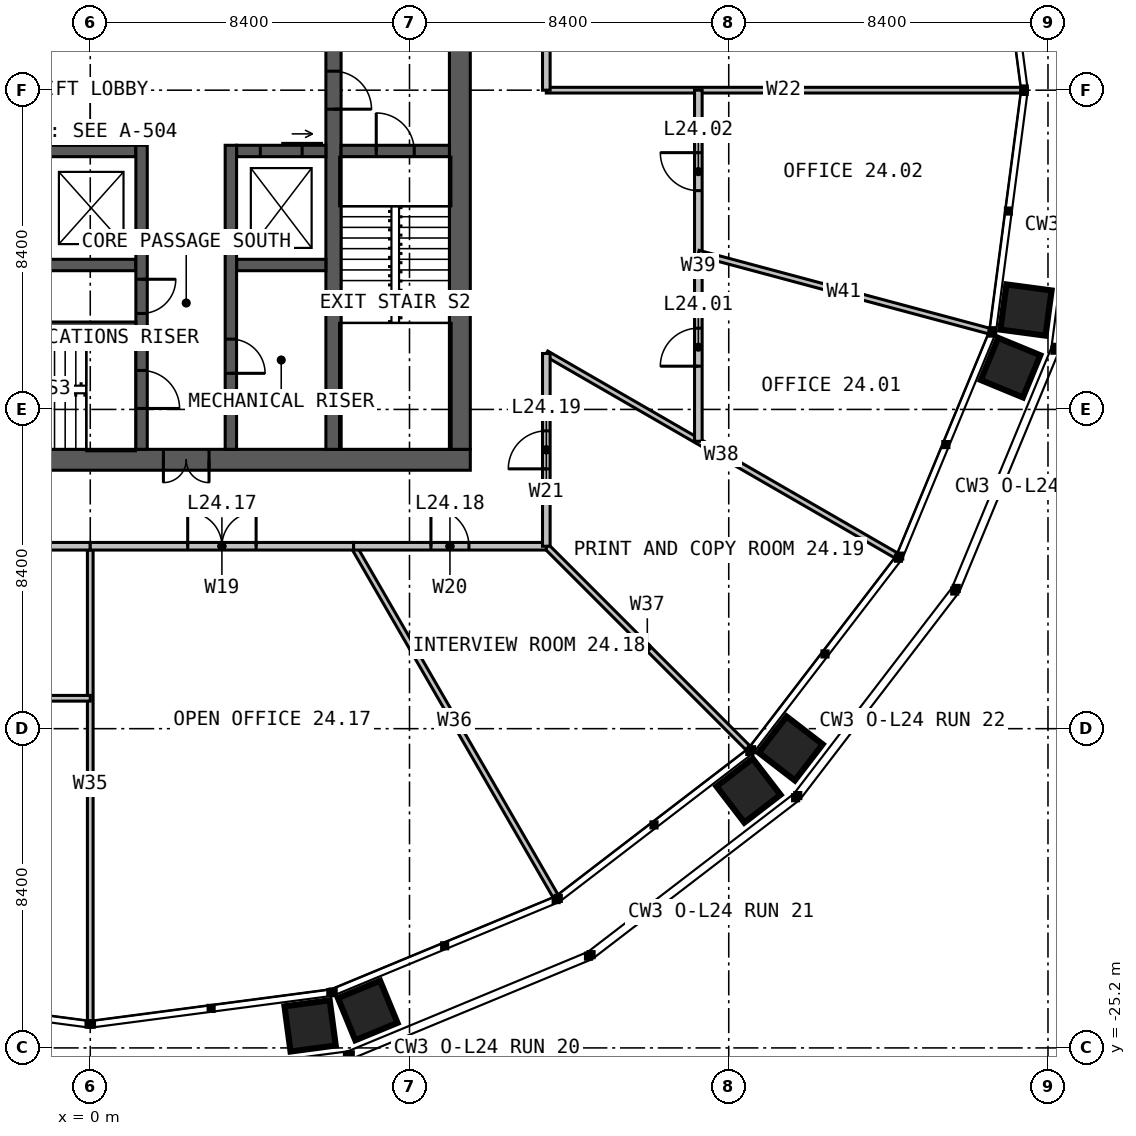
"""IFC4 building model, lengths in metres.
Left out: names, types, materials, properties, quantities, classifications, styles, units other than length and angle.
Written with IfcOpenShell. Run it as: python <this file> out.ifc"""

import sys

from ifc_helpers import new_model, si_unit, direction, frame, frame_2d, origin, place, context, subcontext, project, spatial, rectangle, extrude, element, fill, save


model = new_model("IFC4")
c1 = context("Model", 3, precision=1e-05, world=origin(), true_north=direction((0.0, 1.0)))
c2 = subcontext(c1, "Body", "Model", "MODEL_VIEW")
j1 = project(units=[si_unit("LENGTHUNIT", "METRE"), si_unit("PLANEANGLEUNIT", "RADIAN")], contexts=[c1])
p1 = place(None, origin())
s1 = spatial("IfcSite", under=j1, at=p1, CompositionType="ELEMENT")
p2 = place(p1, origin())
s2 = spatial("IfcBuilding", under=s1, at=p2, CompositionType="ELEMENT")
p3 = place(p2, frame((0.0, 0.0, 102.0)))
s3 = spatial("IfcBuildingStorey", under=s2, at=p3, CompositionType="ELEMENT", Elevation=102.0)
p4 = place(p3, frame((10.0, -9.725, 0.0), z_axis=(0.0, 0.0, 1.0), x_axis=(-1.0, 0.0, 0.0)))
e1 = element("IfcWall", 1, at=p4, inside=s3, PredefinedType="SOLIDWALL", context=c2, shape_type="SweptSolid", body=[
    extrude(rectangle(XDim=20.0, YDim=0.55, at=frame_2d((10.0, 0.0))), origin(), (0.0, 0.0, 1.0), 4.0),
])
p5 = place(p4, frame((6.875, 0.0, 0.0)))
e2 = element("IfcOpeningElement", 2, at=p5, cuts=e1, PredefinedType="OPENING", context=c2, shape_type="SweptSolid", body=[
    extrude(rectangle(XDim=1.2, YDim=2.2, at=frame_2d((0.6, 1.1))), frame((0.0, 0.285, 0.0), z_axis=(0.0, -1.0, 0.0), x_axis=(1.0, 0.0, 0.0)), (0.0, 0.0, 1.0), 0.57),
])
p6 = place(p3, frame((9.725, -9.45, 0.0), z_axis=(0.0, 0.0, 1.0), x_axis=(0.0, 1.0, 0.0)))
e3 = element("IfcWall", 3, at=p6, inside=s3, PredefinedType="SOLIDWALL", context=c2, shape_type="SweptSolid", body=[
    extrude(rectangle(XDim=18.9, YDim=0.55, at=frame_2d((9.45, 0.0))), origin(), (0.0, 0.0, 1.0), 4.0),
])
p7 = place(p3, frame((6.4, 9.45, 0.0), z_axis=(0.0, 0.0, 1.0), x_axis=(0.0, -1.0, 0.0)))
e4 = element("IfcWall", 4, at=p7, inside=s3, PredefinedType="SOLIDWALL", context=c2, shape_type="SweptSolid", body=[
    extrude(rectangle(XDim=18.9, YDim=0.4, at=frame_2d((9.45, 0.0))), origin(), (0.0, 0.0, 1.0), 4.0),
])
p8 = place(p7, frame((8.95, 0.0, 0.0)))
e5 = element("IfcOpeningElement", 5, at=p8, cuts=e4, PredefinedType="OPENING", context=c2, shape_type="SweptSolid", body=[
    extrude(rectangle(XDim=1.0, YDim=2.2, at=frame_2d((0.5, 1.1))), frame((0.0, 0.21, 0.0), z_axis=(0.0, -1.0, 0.0), x_axis=(1.0, 0.0, 0.0)), (0.0, 0.0, 1.0), 0.42),
])
p9 = place(p3, frame((-6.2, -1.6, 0.0), z_axis=(0.0, 0.0, 1.0), x_axis=(1.0, 0.0, 0.0)))
e6 = element("IfcWall", 6, at=p9, inside=s3, PredefinedType="SOLIDWALL", context=c2, shape_type="SweptSolid", body=[
    extrude(rectangle(XDim=7.4, YDim=0.3, at=frame_2d((3.7, 0.0))), origin(), (0.0, 0.0, 1.0), 4.0),
])
p10 = place(p3, frame((3.85, -1.6, 0.0), z_axis=(0.0, 0.0, 1.0), x_axis=(1.0, 0.0, 0.0)))
e7 = element("IfcWall", 7, at=p10, inside=s3, PredefinedType="SOLIDWALL", context=c2, shape_type="SweptSolid", body=[
    extrude(rectangle(XDim=2.35, YDim=0.3, at=frame_2d((1.175, 0.0))), origin(), (0.0, 0.0, 1.0), 4.0),
])
p11 = place(p10, frame((0.625, 0.0, 0.0)))
e8 = element("IfcOpeningElement", 8, at=p11, cuts=e7, PredefinedType="OPENING", context=c2, shape_type="SweptSolid", body=[
    extrude(rectangle(XDim=1.1, YDim=2.2, at=frame_2d((0.55, 1.1))), frame((0.0, 0.16, 0.0), z_axis=(0.0, -1.0, 0.0), x_axis=(1.0, 0.0, 0.0)), (0.0, 0.0, 1.0), 0.32),
])
p12 = place(p3, frame((-6.2, -4.6, 0.0), z_axis=(0.0, 0.0, 1.0), x_axis=(1.0, 0.0, 0.0)))
e9 = element("IfcWall", 9, at=p12, inside=s3, PredefinedType="SOLIDWALL", context=c2, shape_type="SweptSolid", body=[
    extrude(rectangle(XDim=7.4, YDim=0.3, at=frame_2d((3.7, 0.0))), origin(), (0.0, 0.0, 1.0), 4.0),
])
p13 = place(p3, frame((3.85, -4.6, 0.0), z_axis=(0.0, 0.0, 1.0), x_axis=(1.0, 0.0, 0.0)))
e10 = element("IfcWall", 10, at=p13, inside=s3, PredefinedType="SOLIDWALL", context=c2, shape_type="SweptSolid", body=[
    extrude(rectangle(XDim=2.35, YDim=0.3, at=frame_2d((1.175, 0.0))), origin(), (0.0, 0.0, 1.0), 4.0),
])
p14 = place(p3, frame((1.35, -1.45, 0.0), z_axis=(0.0, 0.0, 1.0), x_axis=(0.0, -1.0, 0.0)))
e11 = element("IfcWall", 11, at=p14, inside=s3, PredefinedType="SOLIDWALL", context=c2, shape_type="SweptSolid", body=[
    extrude(rectangle(XDim=8.0, YDim=0.3, at=frame_2d((4.0, 0.0))), origin(), (0.0, 0.0, 1.0), 4.0),
])
p15 = place(p14, frame((5.925, 0.0, 0.0)))
e12 = element("IfcOpeningElement", 12, at=p15, cuts=e11, PredefinedType="OPENING", context=c2, shape_type="SweptSolid", body=[
    extrude(rectangle(XDim=1.0, YDim=2.2, at=frame_2d((0.5, 1.1))), frame((0.0, 0.16, 0.0), z_axis=(0.0, -1.0, 0.0), x_axis=(1.0, 0.0, 0.0)), (0.0, 0.0, 1.0), 0.32),
])
p16 = place(p14, frame((3.525, 0.0, 0.0)))
e13 = element("IfcOpeningElement", 13, at=p16, cuts=e11, PredefinedType="OPENING", context=c2, shape_type="SweptSolid", body=[
    extrude(rectangle(XDim=0.9, YDim=2.2, at=frame_2d((0.45, 1.1))), frame((0.0, 0.16, 0.0), z_axis=(0.0, -1.0, 0.0), x_axis=(1.0, 0.0, 0.0)), (0.0, 0.0, 1.0), 0.32),
])
p17 = place(p3, frame((3.7, -1.45, 0.0), z_axis=(0.0, 0.0, 1.0), x_axis=(0.0, -1.0, 0.0)))
e14 = element("IfcWall", 14, at=p17, inside=s3, PredefinedType="SOLIDWALL", context=c2, shape_type="SweptSolid", body=[
    extrude(rectangle(XDim=8.0, YDim=0.3, at=frame_2d((4.0, 0.0))), origin(), (0.0, 0.0, 1.0), 4.0),
])
p18 = place(p17, frame((5.1, 0.0, 0.0)))
e15 = element("IfcOpeningElement", 15, at=p18, cuts=e14, PredefinedType="OPENING", context=c2, shape_type="SweptSolid", body=[
    extrude(rectangle(XDim=0.9, YDim=2.2, at=frame_2d((0.45, 1.1))), frame((0.0, 0.16, 0.0), z_axis=(0.0, -1.0, 0.0), x_axis=(1.0, 0.0, 0.0)), (0.0, 0.0, 1.0), 0.32),
])
p19 = place(p3, frame((-6.2, -6.2, 0.0), z_axis=(0.0, 0.0, 1.0), x_axis=(1.0, 0.0, 0.0)))
e16 = element("IfcWall", 16, at=p19, inside=s3, PredefinedType="SOLIDWALL", context=c2, shape_type="SweptSolid", body=[
    extrude(rectangle(XDim=7.4, YDim=0.2, at=frame_2d((3.7, 0.0))), origin(), (0.0, 0.0, 1.0), 4.0),
])
p20 = place(p3, frame((6.6, -1.6, 0.0), z_axis=(0.0, 0.0, 1.0), x_axis=(1.0, 0.0, 0.0)))
e17 = element("IfcWall", 17, at=p20, inside=s3, PredefinedType="SOLIDWALL", context=c2, shape_type="SweptSolid", body=[
    extrude(rectangle(XDim=2.85, YDim=0.3, at=frame_2d((1.425, 0.0))), origin(), (0.0, 0.0, 1.0), 4.0),
])
p21 = place(p20, frame((0.925, 0.0, 0.0)))
e18 = element("IfcOpeningElement", 18, at=p21, cuts=e17, PredefinedType="OPENING", context=c2, shape_type="SweptSolid", body=[
    extrude(rectangle(XDim=1.0, YDim=2.2, at=frame_2d((0.5, 1.1))), frame((0.0, 0.16, 0.0), z_axis=(0.0, -1.0, 0.0), x_axis=(1.0, 0.0, 0.0)), (0.0, 0.0, 1.0), 0.32),
])
p22 = place(p3, frame((12.0, -6.928, 0.0), z_axis=(0.0, 0.0, 1.0), x_axis=(0.866024197053, -0.500002090115, 0.0)))
e19 = element("IfcWall", 19, at=p22, inside=s3, PredefinedType="PARTITIONING", context=c2, shape_type="SweptSolid", body=[
    extrude(rectangle(XDim=10.631, YDim=0.15, at=frame_2d((5.315, 0.0))), origin(), (0.0, 0.0, 1.0), 2.79),
])
for number, where, z_axis, x_axis in (
    (20, (12.0, 0.0, 0.0), (0.0, 0.0, 1.0), (1.0, 0.0, 0.0)),
    (21, (0.0, -12.0, 0.0), (0.0, 0.0, 1.0), (0.0, -1.0, 0.0)),
):
    element("IfcWall", number, at=place(p3, frame(where, z_axis=z_axis, x_axis=x_axis)), inside=s3, PredefinedType="PARTITIONING", context=c2, shape_type="SweptSolid", body=[
        extrude(rectangle(XDim=12.487, YDim=0.15, at=frame_2d((6.244, 0.0))), origin(), (0.0, 0.0, 1.0), 2.79),
    ])
p23 = place(p3, frame((6.928, -12.0, 0.0), z_axis=(0.0, 0.0, 1.0), x_axis=(0.500002090115, -0.866024197053, 0.0)))
e22 = element("IfcWall", 22, at=p23, inside=s3, PredefinedType="PARTITIONING", context=c2, shape_type="SweptSolid", body=[
    extrude(rectangle(XDim=10.631, YDim=0.15, at=frame_2d((5.315, 0.0))), origin(), (0.0, 0.0, 1.0), 2.79),
])
p24 = place(p3, frame((12.0, -12.0, 0.0), z_axis=(0.0, 0.0, 1.0), x_axis=(0.707106781187, -0.707106781187, 0.0)))
e23 = element("IfcWall", 23, at=p24, inside=s3, PredefinedType="PARTITIONING", context=c2, shape_type="SweptSolid", body=[
    extrude(rectangle(XDim=7.517, YDim=0.15, at=frame_2d((3.758, 0.0))), origin(), (0.0, 0.0, 1.0), 2.79),
])
p25 = place(p3, frame((16.0, -9.238, 0.0), z_axis=(0.0, 0.0, 1.0), x_axis=(0.0, 1.0, 0.0)))
e24 = element("IfcWall", 24, at=p25, inside=s3, PredefinedType="PARTITIONING", context=c2, shape_type="SweptSolid", body=[
    extrude(rectangle(XDim=9.238, YDim=0.2, at=frame_2d((4.619, 0.0))), origin(), (0.0, 0.0, 1.0), 3.8),
])
p26 = place(p25, frame((1.975, 0.0, 0.0)))
e25 = element("IfcOpeningElement", 25, at=p26, cuts=e24, PredefinedType="OPENING", context=c2, shape_type="SweptSolid", body=[
    extrude(rectangle(XDim=1.0, YDim=2.2, at=frame_2d((0.5, 1.1))), frame((0.0, 0.11, 0.0), z_axis=(0.0, -1.0, 0.0), x_axis=(1.0, 0.0, 0.0)), (0.0, 0.0, 1.0), 0.22),
])
p27 = place(p25, frame((6.594, 0.0, 0.0)))
e26 = element("IfcOpeningElement", 26, at=p27, cuts=e24, PredefinedType="OPENING", context=c2, shape_type="SweptSolid", body=[
    extrude(rectangle(XDim=1.0, YDim=2.2, at=frame_2d((0.5, 1.1))), frame((0.0, 0.11, 0.0), z_axis=(0.0, -1.0, 0.0), x_axis=(1.0, 0.0, 0.0)), (0.0, 0.0, 1.0), 0.22),
])
p28 = place(p3, frame((16.0, -4.287, 0.0), z_axis=(0.0, 0.0, 1.0), x_axis=(0.965926869261, -0.258815152648, 0.0)))
e27 = element("IfcWall", 27, at=p28, inside=s3, PredefinedType="PARTITIONING", context=c2, shape_type="SweptSolid", body=[
    extrude(rectangle(XDim=7.923, YDim=0.15, at=frame_2d((3.961, 0.0))), origin(), (0.0, 0.0, 1.0), 2.79),
])
p29 = place(p3, frame((12.0, 0.0, 0.0), z_axis=(0.0, 0.0, 1.0), x_axis=(0.0, 1.0, 0.0)))
e28 = element("IfcWall", 28, at=p29, inside=s3, PredefinedType="PARTITIONING", context=c2, shape_type="SweptSolid", body=[
    extrude(rectangle(XDim=6.928, YDim=0.2, at=frame_2d((3.464, 0.0))), origin(), (0.0, 0.0, 1.0), 3.8),
])
p30 = place(p29, frame((2.964, 0.0, 0.0)))
e29 = element("IfcOpeningElement", 29, at=p30, cuts=e28, PredefinedType="OPENING", context=c2, shape_type="SweptSolid", body=[
    extrude(rectangle(XDim=1.0, YDim=2.2, at=frame_2d((0.5, 1.1))), frame((0.0, 0.11, 0.0), z_axis=(0.0, -1.0, 0.0), x_axis=(1.0, 0.0, 0.0)), (0.0, 0.0, 1.0), 0.22),
])
p31 = place(p3, frame((-9.238, -16.0, 0.0), z_axis=(0.0, 0.0, 1.0), x_axis=(1.0, 0.0, 0.0)))
e30 = element("IfcWall", 30, at=p31, inside=s3, PredefinedType="PARTITIONING", context=c2, shape_type="SweptSolid", body=[
    extrude(rectangle(XDim=9.238, YDim=0.15, at=frame_2d((4.619, 0.0))), origin(), (0.0, 0.0, 1.0), 2.79),
])
p32 = place(p31, frame((3.719, 0.0, 0.0)))
e31 = element("IfcOpeningElement", 31, at=p32, cuts=e30, PredefinedType="OPENING", context=c2, shape_type="SweptSolid", body=[
    extrude(rectangle(XDim=1.8, YDim=2.2, at=frame_2d((0.9, 1.1))), frame((0.0, 0.085, 0.0), z_axis=(0.0, -1.0, 0.0), x_axis=(1.0, 0.0, 0.0)), (0.0, 0.0, 1.0), 0.17),
])
p33 = place(p3, frame((-6.928, -12.0, 0.0), z_axis=(0.0, 0.0, 1.0), x_axis=(1.0, 0.0, 0.0)))
e32 = element("IfcWall", 32, at=p33, inside=s3, PredefinedType="PARTITIONING", context=c2, shape_type="SweptSolid", body=[
    extrude(rectangle(XDim=6.928, YDim=0.2, at=frame_2d((3.464, 0.0))), origin(), (0.0, 0.0, 1.0), 3.8),
])
p34 = place(p33, frame((2.964, 0.0, 0.0)))
e33 = element("IfcOpeningElement", 33, at=p34, cuts=e32, PredefinedType="OPENING", context=c2, shape_type="SweptSolid", body=[
    extrude(rectangle(XDim=1.0, YDim=2.2, at=frame_2d((0.5, 1.1))), frame((0.0, 0.11, 0.0), z_axis=(0.0, -1.0, 0.0), x_axis=(1.0, 0.0, 0.0)), (0.0, 0.0, 1.0), 0.22),
])
p35 = place(p3, frame((0.0, -12.0, 0.0), z_axis=(0.0, 0.0, 1.0), x_axis=(1.0, 0.0, 0.0)))
e34 = element("IfcWall", 34, at=p35, inside=s3, PredefinedType="PARTITIONING", context=c2, shape_type="SweptSolid", body=[
    extrude(rectangle(XDim=6.928, YDim=0.2, at=frame_2d((3.464, 0.0))), origin(), (0.0, 0.0, 1.0), 3.8),
])
p36 = place(p35, frame((2.564, 0.0, 0.0)))
e35 = element("IfcOpeningElement", 35, at=p36, cuts=e34, PredefinedType="OPENING", context=c2, shape_type="SweptSolid", body=[
    extrude(rectangle(XDim=1.8, YDim=2.2, at=frame_2d((0.9, 1.1))), frame((0.0, 0.11, 0.0), z_axis=(0.0, -1.0, 0.0), x_axis=(1.0, 0.0, 0.0)), (0.0, 0.0, 1.0), 0.22),
])
p37 = place(p3, frame((6.928, -12.0, 0.0), z_axis=(0.0, 0.0, 1.0), x_axis=(1.0, 0.0, 0.0)))
e36 = element("IfcWall", 36, at=p37, inside=s3, PredefinedType="PARTITIONING", context=c2, shape_type="SweptSolid", body=[
    extrude(rectangle(XDim=5.072, YDim=0.2, at=frame_2d((2.536, 0.0))), origin(), (0.0, 0.0, 1.0), 3.8),
])
p38 = place(p37, frame((2.036, 0.0, 0.0)))
e37 = element("IfcOpeningElement", 37, at=p38, cuts=e36, PredefinedType="OPENING", context=c2, shape_type="SweptSolid", body=[
    extrude(rectangle(XDim=1.0, YDim=2.2, at=frame_2d((0.5, 1.1))), frame((0.0, 0.11, 0.0), z_axis=(0.0, -1.0, 0.0), x_axis=(1.0, 0.0, 0.0)), (0.0, 0.0, 1.0), 0.22),
])
p39 = place(p3, frame((12.0, -12.0, 0.0), z_axis=(0.0, 0.0, 1.0), x_axis=(0.0, 1.0, 0.0)))
e38 = element("IfcWall", 38, at=p39, inside=s3, PredefinedType="PARTITIONING", context=c2, shape_type="SweptSolid", body=[
    extrude(rectangle(XDim=5.072, YDim=0.2, at=frame_2d((2.536, 0.0))), origin(), (0.0, 0.0, 1.0), 3.8),
])
p40 = place(p39, frame((2.036, 0.0, 0.0)))
e39 = element("IfcOpeningElement", 39, at=p40, cuts=e38, PredefinedType="OPENING", context=c2, shape_type="SweptSolid", body=[
    extrude(rectangle(XDim=1.0, YDim=2.2, at=frame_2d((0.5, 1.1))), frame((0.0, 0.11, 0.0), z_axis=(0.0, -1.0, 0.0), x_axis=(1.0, 0.0, 0.0)), (0.0, 0.0, 1.0), 0.22),
])
p41 = place(p5, origin())
e40 = element("IfcDoor", 40, at=p41, inside=s3, OperationType="DOUBLE_DOOR_SINGLE_SWING", PredefinedType="DOOR", context=c2, shape_type="SweptSolid", body=[
    extrude(rectangle(XDim=1.2, YDim=2.2, at=frame_2d((0.6, 1.1))), frame((0.0, 0.025, 0.0), z_axis=(0.0, -1.0, 0.0), x_axis=(1.0, 0.0, 0.0)), (0.0, 0.0, 1.0), 0.05),
])
fill(e2, e40)
p42 = place(p8, origin())
e41 = element("IfcDoor", 41, at=p42, inside=s3, OperationType="SINGLE_SWING_RIGHT", PredefinedType="DOOR", context=c2, shape_type="SweptSolid", body=[
    extrude(rectangle(XDim=1.0, YDim=2.2, at=frame_2d((0.5, 1.1))), frame((0.0, 0.025, 0.0), z_axis=(0.0, -1.0, 0.0), x_axis=(1.0, 0.0, 0.0)), (0.0, 0.0, 1.0), 0.05),
])
fill(e5, e41)
p43 = place(p21, origin())
e42 = element("IfcDoor", 42, at=p43, inside=s3, OperationType="SINGLE_SWING_LEFT", PredefinedType="DOOR", context=c2, shape_type="SweptSolid", body=[
    extrude(rectangle(XDim=1.0, YDim=2.2, at=frame_2d((0.5, 1.1))), frame((0.0, 0.025, 0.0), z_axis=(0.0, -1.0, 0.0), x_axis=(1.0, 0.0, 0.0)), (0.0, 0.0, 1.0), 0.05),
])
fill(e18, e42)
p44 = place(p15, origin())
e43 = element("IfcDoor", 43, at=p44, inside=s3, OperationType="SINGLE_SWING_RIGHT", PredefinedType="DOOR", context=c2, shape_type="SweptSolid", body=[
    extrude(rectangle(XDim=1.0, YDim=2.2, at=frame_2d((0.5, 1.1))), frame((0.0, 0.025, 0.0), z_axis=(0.0, -1.0, 0.0), x_axis=(1.0, 0.0, 0.0)), (0.0, 0.0, 1.0), 0.05),
])
fill(e12, e43)
p45 = place(p16, origin())
e44 = element("IfcDoor", 44, at=p45, inside=s3, OperationType="SINGLE_SWING_LEFT", PredefinedType="DOOR", context=c2, shape_type="SweptSolid", body=[
    extrude(rectangle(XDim=0.9, YDim=2.2, at=frame_2d((0.45, 1.1))), frame((0.0, 0.025, 0.0), z_axis=(0.0, -1.0, 0.0), x_axis=(1.0, 0.0, 0.0)), (0.0, 0.0, 1.0), 0.05),
])
fill(e13, e44)
p46 = place(p18, origin())
e45 = element("IfcDoor", 45, at=p46, inside=s3, OperationType="SINGLE_SWING_RIGHT", PredefinedType="DOOR", context=c2, shape_type="SweptSolid", body=[
    extrude(rectangle(XDim=0.9, YDim=2.2, at=frame_2d((0.45, 1.1))), frame((0.0, 0.025, 0.0), z_axis=(0.0, -1.0, 0.0), x_axis=(1.0, 0.0, 0.0)), (0.0, 0.0, 1.0), 0.05),
])
fill(e15, e45)
p47 = place(p11, origin())
e46 = element("IfcDoor", 46, at=p47, inside=s3, OperationType="SLIDING_TO_LEFT", PredefinedType="DOOR", context=c2, shape_type="SweptSolid", body=[
    extrude(rectangle(XDim=1.1, YDim=2.2, at=frame_2d((0.55, 1.1))), frame((0.0, 0.025, 0.0), z_axis=(0.0, -1.0, 0.0), x_axis=(1.0, 0.0, 0.0)), (0.0, 0.0, 1.0), 0.05),
])
fill(e8, e46)
p48 = place(p26, origin())
e47 = element("IfcDoor", 47, at=p48, inside=s3, OperationType="SINGLE_SWING_LEFT", PredefinedType="DOOR", context=c2, shape_type="SweptSolid", body=[
    extrude(rectangle(XDim=1.0, YDim=2.2, at=frame_2d((0.5, 1.1))), frame((0.0, 0.025, 0.0), z_axis=(0.0, -1.0, 0.0), x_axis=(1.0, 0.0, 0.0)), (0.0, 0.0, 1.0), 0.05),
])
fill(e25, e47)
p49 = place(p27, origin())
e48 = element("IfcDoor", 48, at=p49, inside=s3, OperationType="SINGLE_SWING_RIGHT", PredefinedType="DOOR", context=c2, shape_type="SweptSolid", body=[
    extrude(rectangle(XDim=1.0, YDim=2.2, at=frame_2d((0.5, 1.1))), frame((0.0, 0.025, 0.0), z_axis=(0.0, -1.0, 0.0), x_axis=(1.0, 0.0, 0.0)), (0.0, 0.0, 1.0), 0.05),
])
fill(e26, e48)
p50 = place(p36, origin())
e49 = element("IfcDoor", 49, at=p50, inside=s3, OperationType="DOUBLE_DOOR_SINGLE_SWING", PredefinedType="DOOR", context=c2, shape_type="SweptSolid", body=[
    extrude(rectangle(XDim=1.8, YDim=2.2, at=frame_2d((0.9, 1.1))), frame((0.0, 0.025, 0.0), z_axis=(0.0, -1.0, 0.0), x_axis=(1.0, 0.0, 0.0)), (0.0, 0.0, 1.0), 0.05),
])
fill(e35, e49)
p51 = place(p38, origin())
e50 = element("IfcDoor", 50, at=p51, inside=s3, OperationType="SINGLE_SWING_LEFT", PredefinedType="DOOR", context=c2, shape_type="SweptSolid", body=[
    extrude(rectangle(XDim=1.0, YDim=2.2, at=frame_2d((0.5, 1.1))), frame((0.0, 0.025, 0.0), z_axis=(0.0, -1.0, 0.0), x_axis=(1.0, 0.0, 0.0)), (0.0, 0.0, 1.0), 0.05),
])
fill(e37, e50)
p52 = place(p40, origin())
e51 = element("IfcDoor", 51, at=p52, inside=s3, OperationType="SINGLE_SWING_LEFT", PredefinedType="DOOR", context=c2, shape_type="SweptSolid", body=[
    extrude(rectangle(XDim=1.0, YDim=2.2, at=frame_2d((0.5, 1.1))), frame((0.0, 0.025, 0.0), z_axis=(0.0, -1.0, 0.0), x_axis=(1.0, 0.0, 0.0)), (0.0, 0.0, 1.0), 0.05),
])
fill(e39, e51)
save(model, sys.argv[1])
